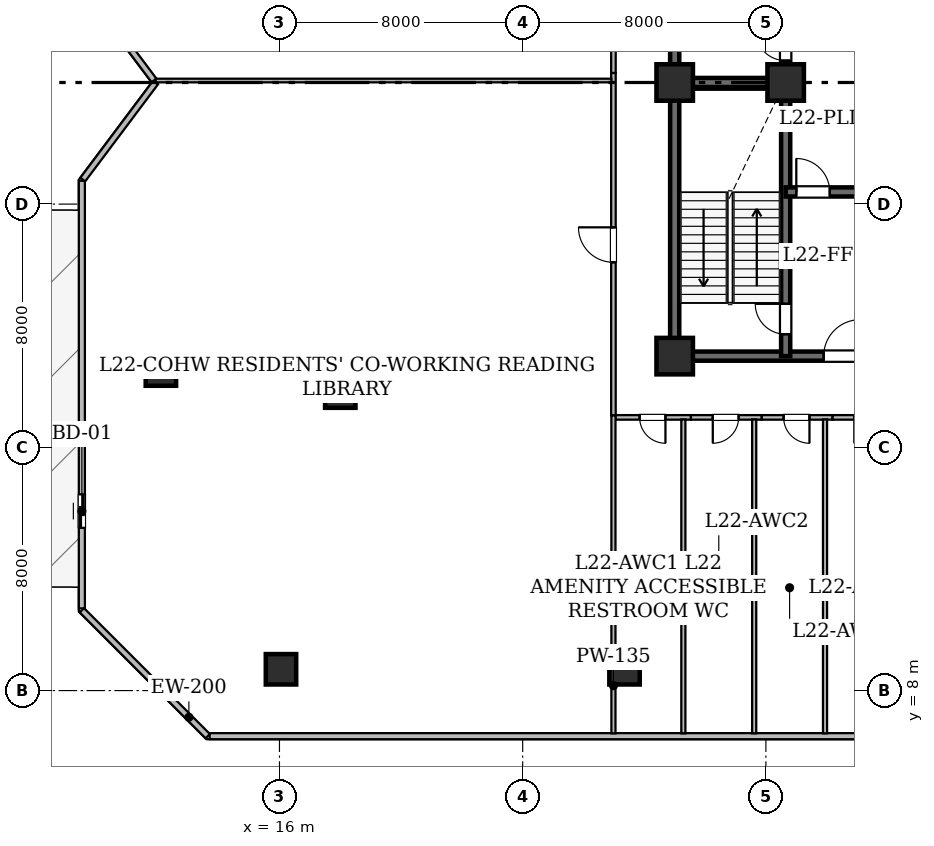
"""IFC4 building model, lengths in metres.
Left out: names, types, materials, properties, quantities, classifications, styles, units other than length and angle.
Written with IfcOpenShell. Run it as: python <this file> out.ifc"""

import sys

from ifc_helpers import new_model, si_unit, direction, frame, frame_2d, origin, origin_2d, place, context, subcontext, project, spatial, rectangle, hollow_rectangle, extrude, element, fill, save


model = new_model("IFC4")
c1 = context("Model", 3, precision=1e-05, world=origin(), true_north=direction((0.0, 1.0)))
c2 = subcontext(c1, "Body", "Model", "MODEL_VIEW")
j1 = project(units=[si_unit("LENGTHUNIT", "METRE"), si_unit("PLANEANGLEUNIT", "RADIAN")], contexts=[c1])
p1 = place(None, origin())
s1 = spatial("IfcSite", under=j1, at=p1, CompositionType="ELEMENT")
p2 = place(p1, origin())
s2 = spatial("IfcBuilding", under=s1, at=p2, CompositionType="ELEMENT")
p3 = place(p2, frame((0.0, 0.0, 89.8)))
s3 = spatial("IfcBuildingStorey", under=s2, at=p3, CompositionType="ELEMENT", Elevation=89.8)
for number, where, z_axis, x_axis in (
    (1, (29.0, 19.0, 0.0), (0.0, 0.0, 1.0), (1.0, 0.0, 0.0)),
    (2, (32.65, 28.0, 0.0), (0.0, 0.0, 1.0), (1.0, 0.0, 0.0)),
    (3, (29.0, 28.0, 0.0), (0.0, 0.0, 1.0), (1.0, 0.0, 0.0)),
):
    element("IfcColumn", number, at=place(p3, frame(where, z_axis=z_axis, x_axis=x_axis)), inside=s3, PredefinedType="COLUMN", context=c2, shape_type="SweptSolid", body=[
        extrude(hollow_rectangle(XDim=1.2, YDim=1.2, WallThickness=0.06, at=origin_2d()), origin(), (0.0, 0.0, 1.0), 4.8),
    ])
for number, where, z_axis, x_axis in (
    (4, (16.05, 8.7, 0.025), (0.0, 0.0, 1.0), (1.0, 0.0, 0.0)),
    (5, (27.35, 8.7, 0.025), (0.0, 0.0, 1.0), (1.0, 0.0, 0.0)),
    (6, (12.1, 18.525, 0.025), (0.0, 0.0, 1.0), (1.0, 0.0, 0.0)),
):
    element("IfcColumn", number, at=place(p3, frame(where, z_axis=z_axis, x_axis=x_axis)), inside=s3, PredefinedType="COLUMN", context=c2, shape_type="SweptSolid", body=[
        extrude(hollow_rectangle(XDim=1.0, YDim=1.0, WallThickness=0.05, at=origin_2d()), origin(), (0.0, 0.0, 1.0), 4.775),
    ])
p4 = place(p3, frame((18.0, 17.8, 0.0), z_axis=(0.0, 0.0, 1.0), x_axis=(1.0, 0.0, 0.0)))
e7 = element("IfcColumn", 7, at=p4, inside=s3, PredefinedType="COLUMN", context=c2, shape_type="SweptSolid", body=[
    extrude(hollow_rectangle(XDim=1.0, YDim=1.0, WallThickness=0.05, at=origin_2d()), origin(), (0.0, 0.0, 1.0), 4.8),
])
p5 = place(p3, frame((13.641, 6.5, 0.0), z_axis=(0.0, 0.0, 1.0), x_axis=(-0.707106781187, 0.707106781187, 0.0)))
e8 = element("IfcWall", 8, at=p5, inside=s3, PredefinedType="STANDARD", context=c2, shape_type="SweptSolid", body=[
    extrude(rectangle(XDim=5.856, YDim=0.2, at=frame_2d((2.928, 0.0))), origin(), (0.0, 0.0, 1.0), 4.58),
])
p6 = place(p3, frame((9.5, 10.704, 0.0), z_axis=(0.0, 0.0, 1.0), x_axis=(0.0, 1.0, 0.0)))
e9 = element("IfcWall", 9, at=p6, inside=s3, PredefinedType="STANDARD", context=c2, shape_type="SweptSolid", body=[
    extrude(rectangle(XDim=14.063, YDim=0.2, at=frame_2d((7.031, 0.0))), origin(), (0.0, 0.0, 1.0), 4.58),
])
p7 = place(p6, frame((2.649, 0.0, 0.0)))
e10 = element("IfcOpeningElement", 10, at=p7, cuts=e9, PredefinedType="OPENING", context=c2, shape_type="SweptSolid", body=[
    extrude(rectangle(XDim=1.1, YDim=2.2, at=frame_2d((0.55, 1.1))), frame((0.0, 0.11, 0.0), z_axis=(0.0, -1.0, 0.0), x_axis=(1.0, 0.0, 0.0)), (0.0, 0.0, 1.0), 0.22),
])
p8 = place(p3, frame((9.53, 24.807, 0.0), z_axis=(0.0, 0.0, 1.0), x_axis=(0.600029358831, 0.799977980035, 0.0)))
e11 = element("IfcWall", 11, at=p8, inside=s3, PredefinedType="STANDARD", context=c2, shape_type="SweptSolid", body=[
    extrude(rectangle(XDim=3.991, YDim=0.2, at=frame_2d((1.996, 0.0))), origin(), (0.0, 0.0, 1.0), 4.58),
])
p9 = place(p3, frame((11.873, 28.069, 0.0), z_axis=(0.0, 0.0, 1.0), x_axis=(-0.600029630681, 0.799977776132, 0.0)))
e12 = element("IfcWall", 12, at=p9, inside=s3, PredefinedType="STANDARD", context=c2, shape_type="SweptSolid", body=[
    extrude(rectangle(XDim=3.955, YDim=0.2, at=frame_2d((1.978, 0.0))), origin(), (0.0, 0.0, 1.0), 4.58),
])
p10 = place(p3, frame((52.296, 6.5, 0.0), z_axis=(0.0, 0.0, 1.0), x_axis=(-1.0, 0.0, 0.0)))
e13 = element("IfcWall", 13, at=p10, inside=s3, PredefinedType="STANDARD", context=c2, shape_type="SweptSolid", body=[
    extrude(rectangle(XDim=38.593, YDim=0.2, at=frame_2d((19.296, 0.0))), origin(), (0.0, 0.0, 1.0), 4.58),
])
p11 = place(p10, frame((12.883, 0.0, 0.9)))
e14 = element("IfcOpeningElement", 14, at=p11, cuts=e13, PredefinedType="OPENING", context=c2, shape_type="SweptSolid", body=[
    extrude(rectangle(XDim=1.8, YDim=1.6, at=frame_2d((0.9, 0.8))), frame((0.0, 0.11, 0.0), z_axis=(0.0, -1.0, 0.0), x_axis=(1.0, 0.0, 0.0)), (0.0, 0.0, 1.0), 0.22),
])
for number, where, z_axis, x_axis in (
    (15, (29.0, 19.0, 0.0), (0.0, 0.0, 1.0), (0.0, 1.0, 0.0)),
    (16, (29.0, 28.0, 0.0), (0.0, 0.0, 1.0), (0.0, 1.0, 0.0)),
):
    element("IfcWall", number, at=place(p3, frame(where, z_axis=z_axis, x_axis=x_axis)), inside=s3, PredefinedType="SHEAR", context=c2, shape_type="SweptSolid", body=[
        extrude(rectangle(XDim=9.0, YDim=0.3, at=frame_2d((4.5, 0.0))), origin(), (0.0, 0.0, 1.0), 4.58),
    ])
p12 = place(p3, frame((29.0, 19.0, 0.0), z_axis=(0.0, 0.0, 1.0), x_axis=(1.0, 0.0, 0.0)))
e17 = element("IfcWall", 17, at=p12, inside=s3, PredefinedType="SHEAR", context=c2, shape_type="SweptSolid", body=[
    extrude(rectangle(XDim=10.4, YDim=0.3, at=frame_2d((5.2, 0.0))), origin(), (0.0, 0.0, 1.0), 4.58),
])
p13 = place(p12, frame((4.9, 0.0, 0.0)))
e18 = element("IfcOpeningElement", 18, at=p13, cuts=e17, PredefinedType="OPENING", context=c2, shape_type="SweptSolid", body=[
    extrude(rectangle(XDim=1.2, YDim=2.15, at=frame_2d((0.6, 1.075))), frame((0.0, 0.16, 0.0), z_axis=(0.0, -1.0, 0.0), x_axis=(1.0, 0.0, 0.0)), (0.0, 0.0, 1.0), 0.32),
])
p14 = place(p3, frame((32.65, 19.0, 0.0), z_axis=(0.0, 0.0, 1.0), x_axis=(0.0, 1.0, 0.0)))
e19 = element("IfcWall", 19, at=p14, inside=s3, PredefinedType="SHEAR", context=c2, shape_type="SweptSolid", body=[
    extrude(rectangle(XDim=9.0, YDim=0.3, at=frame_2d((4.5, 0.0))), origin(), (0.0, 0.0, 1.0), 4.58),
])
p15 = place(p14, frame((0.72, 0.0, 0.0)))
e20 = element("IfcOpeningElement", 20, at=p15, cuts=e19, PredefinedType="OPENING", context=c2, shape_type="SweptSolid", body=[
    extrude(rectangle(XDim=1.0, YDim=2.15, at=frame_2d((0.5, 1.075))), frame((0.0, 0.16, 0.0), z_axis=(0.0, -1.0, 0.0), x_axis=(1.0, 0.0, 0.0)), (0.0, 0.0, 1.0), 0.32),
])
p16 = place(p3, frame((32.65, 28.0, 0.0), z_axis=(0.0, 0.0, 1.0), x_axis=(0.0, 1.0, 0.0)))
e21 = element("IfcWall", 21, at=p16, inside=s3, PredefinedType="SHEAR", context=c2, shape_type="SweptSolid", body=[
    extrude(rectangle(XDim=9.0, YDim=0.3, at=frame_2d((4.5, 0.0))), origin(), (0.0, 0.0, 1.0), 4.58),
])
p17 = place(p16, frame((0.72, 0.0, 0.0)))
e22 = element("IfcOpeningElement", 22, at=p17, cuts=e21, PredefinedType="OPENING", context=c2, shape_type="SweptSolid", body=[
    extrude(rectangle(XDim=1.0, YDim=2.15, at=frame_2d((0.5, 1.075))), frame((0.0, 0.16, 0.0), z_axis=(0.0, -1.0, 0.0), x_axis=(1.0, 0.0, 0.0)), (0.0, 0.0, 1.0), 0.32),
])
p18 = place(p3, frame((29.0, 28.0, 0.0), z_axis=(0.0, 0.0, 1.0), x_axis=(1.0, 0.0, 0.0)))
e23 = element("IfcWall", 23, at=p18, inside=s3, PredefinedType="SHEAR", context=c2, shape_type="SweptSolid", body=[
    extrude(rectangle(XDim=3.65, YDim=0.3, at=frame_2d((1.825, 0.0))), origin(), (0.0, 0.0, 1.0), 4.58),
])
p19 = place(p3, frame((32.65, 24.4, 0.0), z_axis=(0.0, 0.0, 1.0), x_axis=(1.0, 0.0, 0.0)))
e24 = element("IfcWall", 24, at=p19, inside=s3, PredefinedType="SHEAR", context=c2, shape_type="SweptSolid", body=[
    extrude(rectangle(XDim=3.8, YDim=0.3, at=frame_2d((1.9, 0.0))), origin(), (0.0, 0.0, 1.0), 4.58),
])
p20 = place(p19, frame((0.35, 0.0, 0.0)))
e25 = element("IfcOpeningElement", 25, at=p20, cuts=e24, PredefinedType="OPENING", context=c2, shape_type="SweptSolid", body=[
    extrude(rectangle(XDim=1.1, YDim=2.15, at=frame_2d((0.55, 1.075))), frame((0.0, 0.16, 0.0), z_axis=(0.0, -1.0, 0.0), x_axis=(1.0, 0.0, 0.0)), (0.0, 0.0, 1.0), 0.32),
])
p21 = place(p3, frame((26.985, 17.05, 0.0), z_axis=(0.0, 0.0, 1.0), x_axis=(0.0, 1.0, 0.0)))
e26 = element("IfcWall", 26, at=p21, inside=s3, PredefinedType="STANDARD", context=c2, shape_type="SweptSolid", body=[
    extrude(rectangle(XDim=11.264, YDim=0.15, at=frame_2d((5.632, 0.0))), origin(), (0.0, 0.0, 1.0), 3.797),
])
p22 = place(p21, frame((5.036, 0.0, 0.0)))
e27 = element("IfcOpeningElement", 27, at=p22, cuts=e26, PredefinedType="OPENING", context=c2, shape_type="SweptSolid", body=[
    extrude(rectangle(XDim=1.15, YDim=2.2, at=frame_2d((0.575, 1.1))), frame((0.0, 0.085, 0.0), z_axis=(0.0, -1.0, 0.0), x_axis=(1.0, 0.0, 0.0)), (0.0, 0.0, 1.0), 0.17),
])
p23 = place(p3, frame((26.985, 28.314, 0.0), z_axis=(0.0, 0.0, 1.0), x_axis=(0.0, 1.0, 0.0)))
e28 = element("IfcWall", 28, at=p23, inside=s3, PredefinedType="STANDARD", context=c2, shape_type="SweptSolid", body=[
    extrude(rectangle(XDim=10.636, YDim=0.15, at=frame_2d((5.318, 0.0))), origin(), (0.0, 0.0, 1.0), 3.797),
])
p24 = place(p23, frame((4.868, 0.0, 0.0)))
e29 = element("IfcOpeningElement", 29, at=p24, cuts=e28, PredefinedType="OPENING", context=c2, shape_type="SweptSolid", body=[
    extrude(rectangle(XDim=0.9, YDim=2.1, at=frame_2d((0.45, 1.05))), frame((0.0, 0.085, 0.0), z_axis=(0.0, -1.0, 0.0), x_axis=(1.0, 0.0, 0.0)), (0.0, 0.0, 1.0), 0.17),
])
p25 = place(p3, frame((29.534, 16.985, 0.0), z_axis=(0.0, 0.0, 1.0), x_axis=(-1.0, 0.0, 0.0)))
e30 = element("IfcWall", 30, at=p25, inside=s3, PredefinedType="STANDARD", context=c2, shape_type="SweptSolid", body=[
    extrude(rectangle(XDim=2.484, YDim=0.15, at=frame_2d((1.242, 0.0))), origin(), (0.0, 0.0, 1.0), 3.797),
])
p26 = place(p25, frame((0.838, 0.0, 0.0)))
e31 = element("IfcOpeningElement", 31, at=p26, cuts=e30, PredefinedType="OPENING", context=c2, shape_type="SweptSolid", body=[
    extrude(rectangle(XDim=0.85, YDim=2.1, at=frame_2d((0.425, 1.05))), frame((0.0, 0.085, 0.0), z_axis=(0.0, -1.0, 0.0), x_axis=(1.0, 0.0, 0.0)), (0.0, 0.0, 1.0), 0.17),
])
p27 = place(p3, frame((31.864, 16.985, 0.0), z_axis=(0.0, 0.0, 1.0), x_axis=(-1.0, 0.0, 0.0)))
e32 = element("IfcWall", 32, at=p27, inside=s3, PredefinedType="STANDARD", context=c2, shape_type="SweptSolid", body=[
    extrude(rectangle(XDim=2.33, YDim=0.15, at=frame_2d((1.165, 0.0))), origin(), (0.0, 0.0, 1.0), 4.58),
])
p28 = place(p27, frame((0.761, 0.0, 0.0)))
e33 = element("IfcOpeningElement", 33, at=p28, cuts=e32, PredefinedType="OPENING", context=c2, shape_type="SweptSolid", body=[
    extrude(rectangle(XDim=0.85, YDim=2.1, at=frame_2d((0.425, 1.05))), frame((0.0, 0.085, 0.0), z_axis=(0.0, -1.0, 0.0), x_axis=(1.0, 0.0, 0.0)), (0.0, 0.0, 1.0), 0.17),
])
p29 = place(p3, frame((34.194, 16.985, 0.0), z_axis=(0.0, 0.0, 1.0), x_axis=(-1.0, 0.0, 0.0)))
e34 = element("IfcWall", 34, at=p29, inside=s3, PredefinedType="STANDARD", context=c2, shape_type="SweptSolid", body=[
    extrude(rectangle(XDim=2.33, YDim=0.15, at=frame_2d((1.165, 0.0))), origin(), (0.0, 0.0, 1.0), 4.58),
])
p30 = place(p29, frame((0.761, 0.0, 0.0)))
e35 = element("IfcOpeningElement", 35, at=p30, cuts=e34, PredefinedType="OPENING", context=c2, shape_type="SweptSolid", body=[
    extrude(rectangle(XDim=0.85, YDim=2.1, at=frame_2d((0.425, 1.05))), frame((0.0, 0.085, 0.0), z_axis=(0.0, -1.0, 0.0), x_axis=(1.0, 0.0, 0.0)), (0.0, 0.0, 1.0), 0.17),
])
p31 = place(p3, frame((36.514, 16.985, 0.0), z_axis=(0.0, 0.0, 1.0), x_axis=(-1.0, 0.0, 0.0)))
e36 = element("IfcWall", 36, at=p31, inside=s3, PredefinedType="STANDARD", context=c2, shape_type="SweptSolid", body=[
    extrude(rectangle(XDim=2.32, YDim=0.15, at=frame_2d((1.16, 0.0))), origin(), (0.0, 0.0, 1.0), 4.58),
])
p32 = place(p31, frame((0.756, 0.0, 0.0)))
e37 = element("IfcOpeningElement", 37, at=p32, cuts=e36, PredefinedType="OPENING", context=c2, shape_type="SweptSolid", body=[
    extrude(rectangle(XDim=0.85, YDim=2.1, at=frame_2d((0.425, 1.05))), frame((0.0, 0.085, 0.0), z_axis=(0.0, -1.0, 0.0), x_axis=(1.0, 0.0, 0.0)), (0.0, 0.0, 1.0), 0.17),
])
p33 = place(p3, frame((11.928, 28.065, 0.0), z_axis=(0.0, 0.0, 1.0), x_axis=(1.0, 0.0, 0.0)))
e38 = element("IfcWall", 38, at=p33, inside=s3, PredefinedType="PARTITIONING", context=c2, shape_type="SweptSolid", body=[
    extrude(rectangle(XDim=14.99, YDim=0.12, at=frame_2d((7.495, 0.0))), origin(), (0.0, 0.0, 1.0), 3.797),
])
p34 = place(p3, frame((26.985, 17.05, 0.0), z_axis=(0.0, 0.0, 1.0), x_axis=(0.0, -1.0, 0.0)))
e39 = element("IfcWall", 39, at=p34, inside=s3, PredefinedType="PARTITIONING", context=c2, shape_type="SweptSolid", body=[
    extrude(rectangle(XDim=10.458, YDim=0.135, at=frame_2d((5.229, 0.0))), origin(), (0.0, 0.0, 1.0), 3.797),
])
for number, where, z_axis, x_axis in (
    (40, (29.285, 16.918, 0.0), (0.0, 0.0, 1.0), (0.0, -1.0, 0.0)),
    (41, (31.615, 16.918, 0.0), (0.0, 0.0, 1.0), (0.0, -1.0, 0.0)),
    (42, (33.945, 16.918, 0.0), (0.0, 0.0, 1.0), (0.0, -1.0, 0.0)),
):
    element("IfcWall", number, at=place(p3, frame(where, z_axis=z_axis, x_axis=x_axis)), inside=s3, PredefinedType="PARTITIONING", context=c2, shape_type="SweptSolid", body=[
        extrude(rectangle(XDim=10.326, YDim=0.135, at=frame_2d((5.163, 0.0))), origin(), (0.0, 0.0, 1.0), 4.026),
    ])
p35 = place(p7, origin())
e43 = element("IfcDoor", 43, at=p35, inside=s3, OperationType="SLIDING_TO_LEFT", PredefinedType="DOOR", context=c2, shape_type="SweptSolid", body=[
    extrude(rectangle(XDim=1.1, YDim=2.2, at=frame_2d((0.55, 1.1))), frame((0.0, 0.025, 0.0), z_axis=(0.0, -1.0, 0.0), x_axis=(1.0, 0.0, 0.0)), (0.0, 0.0, 1.0), 0.05),
])
fill(e10, e43)
p36 = place(p15, origin())
e44 = element("IfcDoor", 44, at=p36, inside=s3, OperationType="SINGLE_SWING_RIGHT", PredefinedType="DOOR", context=c2, shape_type="SweptSolid", body=[
    extrude(rectangle(XDim=1.0, YDim=2.15, at=frame_2d((0.5, 1.075))), frame((0.0, 0.025, 0.0), z_axis=(0.0, -1.0, 0.0), x_axis=(1.0, 0.0, 0.0)), (0.0, 0.0, 1.0), 0.05),
])
fill(e20, e44)
p37 = place(p17, origin())
e45 = element("IfcDoor", 45, at=p37, inside=s3, OperationType="SINGLE_SWING_RIGHT", PredefinedType="DOOR", context=c2, shape_type="SweptSolid", body=[
    extrude(rectangle(XDim=1.0, YDim=2.15, at=frame_2d((0.5, 1.075))), frame((0.0, 0.025, 0.0), z_axis=(0.0, -1.0, 0.0), x_axis=(1.0, 0.0, 0.0)), (0.0, 0.0, 1.0), 0.05),
])
fill(e22, e45)
p38 = place(p20, origin())
e46 = element("IfcDoor", 46, at=p38, inside=s3, OperationType="SINGLE_SWING_LEFT", PredefinedType="DOOR", context=c2, shape_type="SweptSolid", body=[
    extrude(rectangle(XDim=1.1, YDim=2.15, at=frame_2d((0.55, 1.075))), frame((0.0, 0.025, 0.0), z_axis=(0.0, -1.0, 0.0), x_axis=(1.0, 0.0, 0.0)), (0.0, 0.0, 1.0), 0.05),
])
fill(e25, e46)
p39 = place(p13, origin())
e47 = element("IfcDoor", 47, at=p39, inside=s3, OperationType="SINGLE_SWING_RIGHT", PredefinedType="DOOR", context=c2, shape_type="SweptSolid", body=[
    extrude(rectangle(XDim=1.2, YDim=2.15, at=frame_2d((0.6, 1.075))), frame((0.0, 0.025, 0.0), z_axis=(0.0, -1.0, 0.0), x_axis=(1.0, 0.0, 0.0)), (0.0, 0.0, 1.0), 0.05),
])
fill(e18, e47)
p40 = place(p22, origin())
e48 = element("IfcDoor", 48, at=p40, inside=s3, OperationType="SINGLE_SWING_RIGHT", PredefinedType="DOOR", context=c2, shape_type="SweptSolid", body=[
    extrude(rectangle(XDim=1.15, YDim=2.2, at=frame_2d((0.575, 1.1))), frame((0.0, 0.025, 0.0), z_axis=(0.0, -1.0, 0.0), x_axis=(1.0, 0.0, 0.0)), (0.0, 0.0, 1.0), 0.05),
])
fill(e27, e48)
p41 = place(p26, origin())
e49 = element("IfcDoor", 49, at=p41, inside=s3, OperationType="SINGLE_SWING_LEFT", PredefinedType="DOOR", context=c2, shape_type="SweptSolid", body=[
    extrude(rectangle(XDim=0.85, YDim=2.1, at=frame_2d((0.425, 1.05))), frame((0.0, 0.025, 0.0), z_axis=(0.0, -1.0, 0.0), x_axis=(1.0, 0.0, 0.0)), (0.0, 0.0, 1.0), 0.05),
])
fill(e31, e49)
p42 = place(p28, origin())
e50 = element("IfcDoor", 50, at=p42, inside=s3, OperationType="SINGLE_SWING_RIGHT", PredefinedType="DOOR", context=c2, shape_type="SweptSolid", body=[
    extrude(rectangle(XDim=0.85, YDim=2.1, at=frame_2d((0.425, 1.05))), frame((0.0, 0.025, 0.0), z_axis=(0.0, -1.0, 0.0), x_axis=(1.0, 0.0, 0.0)), (0.0, 0.0, 1.0), 0.05),
])
fill(e33, e50)
p43 = place(p30, origin())
e51 = element("IfcDoor", 51, at=p43, inside=s3, OperationType="SINGLE_SWING_LEFT", PredefinedType="DOOR", context=c2, shape_type="SweptSolid", body=[
    extrude(rectangle(XDim=0.85, YDim=2.1, at=frame_2d((0.425, 1.05))), frame((0.0, 0.025, 0.0), z_axis=(0.0, -1.0, 0.0), x_axis=(1.0, 0.0, 0.0)), (0.0, 0.0, 1.0), 0.05),
])
fill(e35, e51)
save(model, sys.argv[1])
